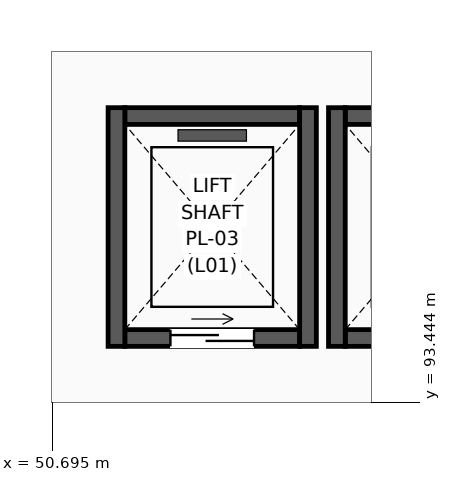
"""IFC4 building model, lengths in metres.
Left out: names, types, materials, properties, quantities, classifications, styles, units other than length and angle.
Written with IfcOpenShell. Run it as: python <this file> out.ifc"""

import sys

from ifc_helpers import new_model, si_unit, direction, frame, frame_2d, origin, place, context, subcontext, project, spatial, rectangle, extrude, element, fill, save


model = new_model("IFC4")
c1 = context("Model", 3, precision=1e-05, world=origin(), true_north=direction((0.0, 1.0)))
c2 = subcontext(c1, "Body", "Model", "MODEL_VIEW")
j1 = project(units=[si_unit("LENGTHUNIT", "METRE"), si_unit("PLANEANGLEUNIT", "RADIAN")], contexts=[c1])
p1 = place(None, origin())
s1 = spatial("IfcSite", under=j1, at=p1, CompositionType="ELEMENT")
p2 = place(p1, origin())
s2 = spatial("IfcBuilding", under=s1, at=p2, CompositionType="ELEMENT")
p3 = place(p2, frame((0.0, 0.0, 5.4)))
s3 = spatial("IfcBuildingStorey", under=s2, at=p3, CompositionType="ELEMENT", Elevation=5.4)
p4 = place(p3, frame((51.65, 94.29, 0.0), z_axis=(0.0, 0.0, 1.0), x_axis=(1.0, 0.0, 0.0)))
e1 = element("IfcWall", 1, at=p4, inside=s3, PredefinedType="SOLIDWALL", context=c2, shape_type="SweptSolid", body=[
    extrude(rectangle(XDim=2.3, YDim=0.22, at=frame_2d((1.15, 0.0))), origin(), (0.0, 0.0, 1.0), 4.525),
])
p5 = place(p4, frame((0.6, 0.0, 0.0)))
e2 = element("IfcOpeningElement", 2, at=p5, cuts=e1, PredefinedType="OPENING", context=c2, shape_type="SweptSolid", body=[
    extrude(rectangle(XDim=1.1, YDim=2.2, at=frame_2d((0.55, 1.1))), frame((0.0, 0.12, 0.0), z_axis=(0.0, -1.0, 0.0), x_axis=(1.0, 0.0, 0.0)), (0.0, 0.0, 1.0), 0.24),
])
p6 = place(p3, frame((51.65, 97.21, 0.0), z_axis=(0.0, 0.0, 1.0), x_axis=(1.0, 0.0, 0.0)))
e3 = element("IfcWall", 3, at=p6, inside=s3, PredefinedType="SOLIDWALL", context=c2, shape_type="SweptSolid", body=[
    extrude(rectangle(XDim=2.3, YDim=0.22, at=frame_2d((1.15, 0.0))), origin(), (0.0, 0.0, 1.0), 4.525),
])
for number, where, z_axis, x_axis in (
    (4, (51.54, 94.18, 0.0), (0.0, 0.0, 1.0), (0.0, 1.0, 0.0)),
    (5, (54.06, 94.18, 0.0), (0.0, 0.0, 1.0), (0.0, 1.0, 0.0)),
):
    element("IfcWall", number, at=place(p3, frame(where, z_axis=z_axis, x_axis=x_axis)), inside=s3, PredefinedType="SOLIDWALL", context=c2, shape_type="SweptSolid", body=[
        extrude(rectangle(XDim=3.14, YDim=0.22, at=frame_2d((1.57, 0.0))), origin(), (0.0, 0.0, 1.0), 4.525),
    ])
p7 = place(p3, frame((54.55, 94.29, 0.0), z_axis=(0.0, 0.0, 1.0), x_axis=(1.0, 0.0, 0.0)))
e6 = element("IfcWall", 6, at=p7, inside=s3, PredefinedType="SOLIDWALL", context=c2, shape_type="SweptSolid", body=[
    extrude(rectangle(XDim=2.3, YDim=0.22, at=frame_2d((1.15, 0.0))), origin(), (0.0, 0.0, 1.0), 4.525),
])
p8 = place(p7, frame((0.6, 0.0, 0.0)))
e7 = element("IfcOpeningElement", 7, at=p8, cuts=e6, PredefinedType="OPENING", context=c2, shape_type="SweptSolid", body=[
    extrude(rectangle(XDim=1.1, YDim=2.2, at=frame_2d((0.55, 1.1))), frame((0.0, 0.12, 0.0), z_axis=(0.0, -1.0, 0.0), x_axis=(1.0, 0.0, 0.0)), (0.0, 0.0, 1.0), 0.24),
])
p9 = place(p3, frame((54.55, 97.21, 0.0), z_axis=(0.0, 0.0, 1.0), x_axis=(1.0, 0.0, 0.0)))
e8 = element("IfcWall", 8, at=p9, inside=s3, PredefinedType="SOLIDWALL", context=c2, shape_type="SweptSolid", body=[
    extrude(rectangle(XDim=2.3, YDim=0.22, at=frame_2d((1.15, 0.0))), origin(), (0.0, 0.0, 1.0), 4.525),
])
p10 = place(p3, frame((54.44, 94.18, 0.0), z_axis=(0.0, 0.0, 1.0), x_axis=(0.0, 1.0, 0.0)))
e9 = element("IfcWall", 9, at=p10, inside=s3, PredefinedType="SOLIDWALL", context=c2, shape_type="SweptSolid", body=[
    extrude(rectangle(XDim=3.14, YDim=0.22, at=frame_2d((1.57, 0.0))), origin(), (0.0, 0.0, 1.0), 4.525),
])
p11 = place(p5, origin())
e10 = element("IfcDoor", 10, at=p11, inside=s3, OperationType="SLIDING_TO_LEFT", PredefinedType="DOOR", context=c2, shape_type="SweptSolid", body=[
    extrude(rectangle(XDim=1.1, YDim=2.2, at=frame_2d((0.55, 1.1))), frame((0.0, 0.025, 0.0), z_axis=(0.0, -1.0, 0.0), x_axis=(1.0, 0.0, 0.0)), (0.0, 0.0, 1.0), 0.05),
])
fill(e2, e10)
save(model, sys.argv[1])
